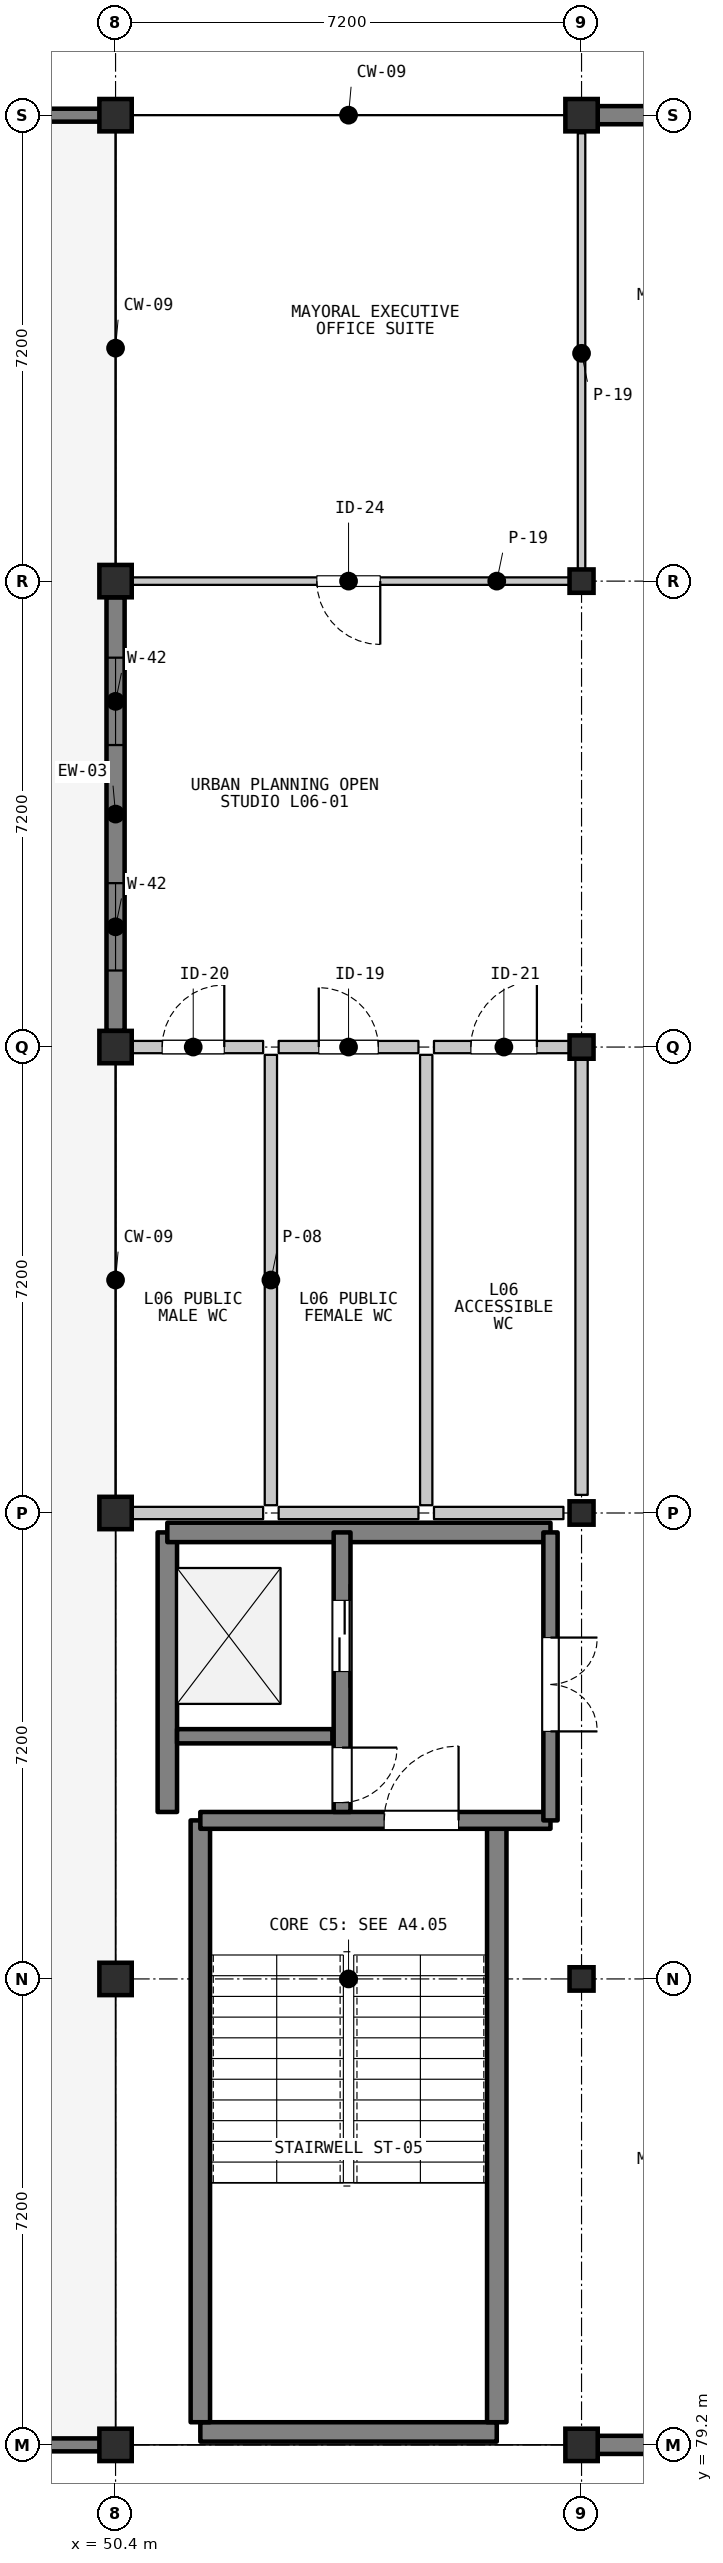
"""IFC4 building model, lengths in metres.
Left out: names, types, materials, properties, quantities, classifications, styles, units other than length and angle.
Written with IfcOpenShell. Run it as: python <this file> out.ifc"""

import sys

from ifc_helpers import new_model, si_unit, direction, frame, frame_2d, origin, origin_2d, place, context, subcontext, project, spatial, rectangle, i_section, extrude, element, fill, save


model = new_model("IFC4")
c1 = context("Model", 3, precision=1e-05, world=origin(), true_north=direction((0.0, 1.0)))
c2 = subcontext(c1, "Body", "Model", "MODEL_VIEW")
j1 = project(units=[si_unit("LENGTHUNIT", "METRE"), si_unit("PLANEANGLEUNIT", "RADIAN")], contexts=[c1])
p1 = place(None, origin())
s1 = spatial("IfcSite", under=j1, at=p1, CompositionType="ELEMENT")
p2 = place(p1, origin())
s2 = spatial("IfcBuilding", under=s1, at=p2, CompositionType="ELEMENT")
p3 = place(p2, frame((0.0, 0.0, 21.9)))
s3 = spatial("IfcBuildingStorey", under=s2, at=p3, CompositionType="ELEMENT", Elevation=21.9)
for number, where, z_axis, x_axis in (
    (1, (50.4, 79.2, 0.0), (0.0, 0.0, 1.0), (1.0, 0.0, 0.0)),
    (2, (50.4, 86.4, 0.0), (0.0, 0.0, 1.0), (1.0, 0.0, 0.0)),
    (3, (50.4, 93.6, 0.0), (0.0, 0.0, 1.0), (1.0, 0.0, 0.0)),
    (4, (50.4, 100.8, 0.0), (0.0, 0.0, 1.0), (1.0, 0.0, 0.0)),
    (5, (50.4, 108.0, 0.0), (0.0, 0.0, 1.0), (1.0, 0.0, 0.0)),
    (6, (50.4, 115.2, 0.0), (0.0, 0.0, 1.0), (1.0, 0.0, 0.0)),
    (7, (57.6, 79.2, 0.0), (0.0, 0.0, 1.0), (1.0, 0.0, 0.0)),
):
    element("IfcColumn", number, at=place(p3, frame(where, z_axis=z_axis, x_axis=x_axis)), inside=s3, PredefinedType="COLUMN", context=c2, shape_type="SweptSolid", body=[
        extrude(rectangle(XDim=0.5, YDim=0.5, at=origin_2d()), origin(), (0.0, 0.0, 1.0), 3.9),
    ])
for number, where, z_axis, x_axis in (
    (8, (57.6, 86.4, 0.0), (0.0, 0.0, 1.0), (1.0, 0.0, 0.0)),
    (9, (57.6, 93.6, 0.0), (0.0, 0.0, 1.0), (1.0, 0.0, 0.0)),
    (10, (57.6, 100.8, 0.0), (0.0, 0.0, 1.0), (1.0, 0.0, 0.0)),
    (11, (57.6, 108.0, 0.0), (0.0, 0.0, 1.0), (1.0, 0.0, 0.0)),
):
    element("IfcColumn", number, at=place(p3, frame(where, z_axis=z_axis, x_axis=x_axis)), inside=s3, PredefinedType="COLUMN", context=c2, shape_type="SweptSolid", body=[
        extrude(i_section(OverallWidth=0.371, OverallDepth=0.361, WebThickness=0.012, FlangeThickness=0.02, FilletRadius=0.015, at=origin_2d()), origin(), (0.0, 0.0, 1.0), 3.9),
    ])
p4 = place(p3, frame((57.6, 115.2, 0.0), z_axis=(0.0, 0.0, 1.0), x_axis=(1.0, 0.0, 0.0)))
e12 = element("IfcColumn", 12, at=p4, inside=s3, PredefinedType="COLUMN", context=c2, shape_type="SweptSolid", body=[
    extrude(rectangle(XDim=0.5, YDim=0.5, at=origin_2d()), origin(), (0.0, 0.0, 1.0), 3.9),
])
p5 = place(p3, frame((50.4, 101.05, 0.0), z_axis=(0.0, 0.0, 1.0), x_axis=(0.0, 1.0, 0.0)))
e13 = element("IfcWall", 13, at=p5, inside=s3, PredefinedType="SOLIDWALL", context=c2, shape_type="SweptSolid", body=[
    extrude(rectangle(XDim=6.7, YDim=0.28, at=frame_2d((3.35, 0.0))), origin(), (0.0, 0.0, 1.0), 3.172),
])
p6 = place(p5, frame((0.933, 0.0, 0.95)))
e14 = element("IfcOpeningElement", 14, at=p6, cuts=e13, PredefinedType="OPENING", context=c2, shape_type="SweptSolid", body=[
    extrude(rectangle(XDim=1.35, YDim=1.85, at=frame_2d((0.675, 0.925))), frame((0.0, 0.15, 0.0), z_axis=(0.0, -1.0, 0.0), x_axis=(1.0, 0.0, 0.0)), (0.0, 0.0, 1.0), 0.3),
])
p7 = place(p5, frame((4.417, 0.0, 0.95)))
e15 = element("IfcOpeningElement", 15, at=p7, cuts=e13, PredefinedType="OPENING", context=c2, shape_type="SweptSolid", body=[
    extrude(rectangle(XDim=1.35, YDim=1.85, at=frame_2d((0.675, 0.925))), frame((0.0, 0.15, 0.0), z_axis=(0.0, -1.0, 0.0), x_axis=(1.0, 0.0, 0.0)), (0.0, 0.0, 1.0), 0.3),
])
p8 = place(p3, frame((64.55, 79.2, 0.0), z_axis=(0.0, 0.0, 1.0), x_axis=(-1.0, 0.0, 0.0)))
e16 = element("IfcWall", 16, at=p8, inside=s3, PredefinedType="SOLIDWALL", context=c2, shape_type="SweptSolid", body=[
    extrude(rectangle(XDim=6.7, YDim=0.28, at=frame_2d((3.35, 0.0))), origin(), (0.0, 0.0, 1.0), 3.192),
])
p9 = place(p3, frame((57.85, 115.2, 0.0), z_axis=(0.0, 0.0, 1.0), x_axis=(1.0, 0.0, 0.0)))
e17 = element("IfcWall", 17, at=p9, inside=s3, PredefinedType="SOLIDWALL", context=c2, shape_type="SweptSolid", body=[
    extrude(rectangle(XDim=6.7, YDim=0.28, at=frame_2d((3.35, 0.0))), origin(), (0.0, 0.0, 1.0), 3.192),
])
p10 = place(p9, frame((0.883, 0.0, 0.95)))
e18 = element("IfcOpeningElement", 18, at=p10, cuts=e17, PredefinedType="OPENING", context=c2, shape_type="SweptSolid", body=[
    extrude(rectangle(XDim=1.45, YDim=1.85, at=frame_2d((0.725, 0.925))), frame((0.0, 0.15, 0.0), z_axis=(0.0, -1.0, 0.0), x_axis=(1.0, 0.0, 0.0)), (0.0, 0.0, 1.0), 0.3),
])
p11 = place(p9, frame((4.367, 0.0, 0.95)))
e19 = element("IfcOpeningElement", 19, at=p11, cuts=e17, PredefinedType="OPENING", context=c2, shape_type="SweptSolid", body=[
    extrude(rectangle(XDim=1.45, YDim=1.85, at=frame_2d((0.725, 0.925))), frame((0.0, 0.15, 0.0), z_axis=(0.0, -1.0, 0.0), x_axis=(1.0, 0.0, 0.0)), (0.0, 0.0, 1.0), 0.3),
])
for number, where, z_axis, x_axis in (
    (20, (43.35, 115.2, 0.0), (0.0, 0.0, 1.0), (1.0, 0.0, 0.0)),
    (21, (50.25, 79.2, 0.0), (0.0, 0.0, 1.0), (-1.0, 0.0, 0.0)),
):
    element("IfcWall", number, at=place(p3, frame(where, z_axis=z_axis, x_axis=x_axis)), inside=s3, PredefinedType="PARAPET", context=c2, shape_type="SweptSolid", body=[
        extrude(rectangle(XDim=6.9, YDim=0.2, at=frame_2d((3.45, 0.0))), origin(), (0.0, 0.0, 1.0), 0.85),
    ])
p12 = place(p3, frame((51.71, 79.4, 0.0), z_axis=(0.0, 0.0, 1.0), x_axis=(1.0, 0.0, 0.0)))
e22 = element("IfcWall", 22, at=p12, inside=s3, PredefinedType="SHEAR", context=c2, shape_type="SweptSolid", body=[
    extrude(rectangle(XDim=4.58, YDim=0.3, at=frame_2d((2.29, 0.0))), origin(), (0.0, 0.0, 1.0), 3.72),
])
for number, where, z_axis, x_axis in (
    (23, (51.71, 79.55, 0.0), (0.0, 0.0, 1.0), (0.0, 1.0, 0.0)),
    (24, (56.29, 79.55, 0.0), (0.0, 0.0, 1.0), (0.0, 1.0, 0.0)),
):
    element("IfcWall", number, at=place(p3, frame(where, z_axis=z_axis, x_axis=x_axis)), inside=s3, PredefinedType="SHEAR", context=c2, shape_type="SweptSolid", body=[
        extrude(rectangle(XDim=9.3, YDim=0.3, at=frame_2d((4.65, 0.0))), origin(), (0.0, 0.0, 1.0), 3.72),
    ])
p13 = place(p3, frame((51.71, 88.85, 0.0), z_axis=(0.0, 0.0, 1.0), x_axis=(1.0, 0.0, 0.0)))
e25 = element("IfcWall", 25, at=p13, inside=s3, PredefinedType="SHEAR", context=c2, shape_type="SweptSolid", body=[
    extrude(rectangle(XDim=5.41, YDim=0.26, at=frame_2d((2.705, 0.0))), origin(), (0.0, 0.0, 1.0), 3.72),
])
p14 = place(p13, frame((2.84, 0.0, 0.0)))
e26 = element("IfcOpeningElement", 26, at=p14, cuts=e25, PredefinedType="OPENING", context=c2, shape_type="SweptSolid", body=[
    extrude(rectangle(XDim=1.15, YDim=2.15, at=frame_2d((0.575, 1.075))), frame((0.0, 0.14, 0.0), z_axis=(0.0, -1.0, 0.0), x_axis=(1.0, 0.0, 0.0)), (0.0, 0.0, 1.0), 0.28),
])
p15 = place(p3, frame((51.2, 88.98, 0.0), z_axis=(0.0, 0.0, 1.0), x_axis=(0.0, 1.0, 0.0)))
e27 = element("IfcWall", 27, at=p15, inside=s3, PredefinedType="SHEAR", context=c2, shape_type="SweptSolid", body=[
    extrude(rectangle(XDim=4.32, YDim=0.3, at=frame_2d((2.16, 0.0))), origin(), (0.0, 0.0, 1.0), 3.72),
])
p16 = place(p3, frame((51.2, 93.3, 0.0), z_axis=(0.0, 0.0, 1.0), x_axis=(1.0, 0.0, 0.0)))
e28 = element("IfcWall", 28, at=p16, inside=s3, PredefinedType="SHEAR", context=c2, shape_type="SweptSolid", body=[
    extrude(rectangle(XDim=5.92, YDim=0.3, at=frame_2d((2.96, 0.0))), origin(), (0.0, 0.0, 1.0), 3.72),
])
p17 = place(p3, frame((51.35, 90.15, 0.0), z_axis=(0.0, 0.0, 1.0), x_axis=(1.0, 0.0, 0.0)))
e29 = element("IfcWall", 29, at=p17, inside=s3, PredefinedType="SHEAR", context=c2, shape_type="SweptSolid", body=[
    extrude(rectangle(XDim=2.4, YDim=0.22, at=frame_2d((1.2, 0.0))), origin(), (0.0, 0.0, 1.0), 3.72),
])
p18 = place(p3, frame((53.9, 93.3, 0.0), z_axis=(0.0, 0.0, 1.0), x_axis=(0.0, -1.0, 0.0)))
e30 = element("IfcWall", 30, at=p18, inside=s3, PredefinedType="SHEAR", context=c2, shape_type="SweptSolid", body=[
    extrude(rectangle(XDim=4.32, YDim=0.26, at=frame_2d((2.16, 0.0))), origin(), (0.0, 0.0, 1.0), 3.72),
])
p19 = place(p18, frame((1.05, 0.0, 0.0)))
e31 = element("IfcOpeningElement", 31, at=p19, cuts=e30, PredefinedType="OPENING", context=c2, shape_type="SweptSolid", body=[
    extrude(rectangle(XDim=1.1, YDim=2.15, at=frame_2d((0.55, 1.075))), frame((0.0, 0.14, 0.0), z_axis=(0.0, -1.0, 0.0), x_axis=(1.0, 0.0, 0.0)), (0.0, 0.0, 1.0), 0.28),
])
p20 = place(p18, frame((3.325, 0.0, 0.0)))
e32 = element("IfcOpeningElement", 32, at=p20, cuts=e30, PredefinedType="OPENING", context=c2, shape_type="SweptSolid", body=[
    extrude(rectangle(XDim=0.85, YDim=2.05, at=frame_2d((0.425, 1.025))), frame((0.0, 0.14, 0.0), z_axis=(0.0, -1.0, 0.0), x_axis=(1.0, 0.0, 0.0)), (0.0, 0.0, 1.0), 0.28),
])
p21 = place(p3, frame((57.12, 93.3, 0.0), z_axis=(0.0, 0.0, 1.0), x_axis=(0.0, -1.0, 0.0)))
e33 = element("IfcWall", 33, at=p21, inside=s3, PredefinedType="SHEAR", context=c2, shape_type="SweptSolid", body=[
    extrude(rectangle(XDim=4.45, YDim=0.22, at=frame_2d((2.225, 0.0))), origin(), (0.0, 0.0, 1.0), 3.72),
])
p22 = place(p21, frame((1.625, 0.0, 0.0)))
e34 = element("IfcOpeningElement", 34, at=p22, cuts=e33, PredefinedType="OPENING", context=c2, shape_type="SweptSolid", body=[
    extrude(rectangle(XDim=1.45, YDim=2.2, at=frame_2d((0.725, 1.1))), frame((0.0, 0.12, 0.0), z_axis=(0.0, -1.0, 0.0), x_axis=(1.0, 0.0, 0.0)), (0.0, 0.0, 1.0), 0.24),
])
p23 = place(p3, frame((50.52, 100.8, 0.0), z_axis=(0.0, 0.0, 1.0), x_axis=(1.0, 0.0, 0.0)))
e35 = element("IfcWall", 35, at=p23, inside=s3, PredefinedType="PARTITIONING", context=c2, shape_type="SweptSolid", body=[
    extrude(rectangle(XDim=2.16, YDim=0.19, at=frame_2d((1.08, 0.0))), origin(), (0.0, 0.0, 1.0), 3.088),
])
p24 = place(p23, frame((0.6, 0.0, 0.0)))
e36 = element("IfcOpeningElement", 36, at=p24, cuts=e35, PredefinedType="OPENING", context=c2, shape_type="SweptSolid", body=[
    extrude(rectangle(XDim=0.96, YDim=2.1, at=frame_2d((0.48, 1.05))), frame((0.0, 0.105, 0.0), z_axis=(0.0, -1.0, 0.0), x_axis=(1.0, 0.0, 0.0)), (0.0, 0.0, 1.0), 0.21),
])
p25 = place(p3, frame((52.68, 93.6, 0.0), z_axis=(0.0, 0.0, 1.0), x_axis=(-1.0, 0.0, 0.0)))
e37 = element("IfcWall", 37, at=p25, inside=s3, PredefinedType="PARTITIONING", context=c2, shape_type="SweptSolid", body=[
    extrude(rectangle(XDim=2.16, YDim=0.19, at=frame_2d((1.08, 0.0))), origin(), (0.0, 0.0, 1.0), 3.088),
])
p26 = place(p3, frame((52.8, 100.68, 0.0), z_axis=(0.0, 0.0, 1.0), x_axis=(0.0, -1.0, 0.0)))
e38 = element("IfcWall", 38, at=p26, inside=s3, PredefinedType="PARTITIONING", context=c2, shape_type="SweptSolid", body=[
    extrude(rectangle(XDim=6.96, YDim=0.19, at=frame_2d((3.48, 0.0))), origin(), (0.0, 0.0, 1.0), 3.088),
])
p27 = place(p3, frame((52.92, 100.8, 0.0), z_axis=(0.0, 0.0, 1.0), x_axis=(1.0, 0.0, 0.0)))
e39 = element("IfcWall", 39, at=p27, inside=s3, PredefinedType="PARTITIONING", context=c2, shape_type="SweptSolid", body=[
    extrude(rectangle(XDim=2.16, YDim=0.19, at=frame_2d((1.08, 0.0))), origin(), (0.0, 0.0, 1.0), 3.088),
])
p28 = place(p27, frame((0.62, 0.0, 0.0)))
e40 = element("IfcOpeningElement", 40, at=p28, cuts=e39, PredefinedType="OPENING", context=c2, shape_type="SweptSolid", body=[
    extrude(rectangle(XDim=0.92, YDim=2.1, at=frame_2d((0.46, 1.05))), frame((0.0, 0.105, 0.0), z_axis=(0.0, -1.0, 0.0), x_axis=(1.0, 0.0, 0.0)), (0.0, 0.0, 1.0), 0.21),
])
p29 = place(p3, frame((55.08, 93.6, 0.0), z_axis=(0.0, 0.0, 1.0), x_axis=(-1.0, 0.0, 0.0)))
e41 = element("IfcWall", 41, at=p29, inside=s3, PredefinedType="PARTITIONING", context=c2, shape_type="SweptSolid", body=[
    extrude(rectangle(XDim=2.16, YDim=0.19, at=frame_2d((1.08, 0.0))), origin(), (0.0, 0.0, 1.0), 3.088),
])
p30 = place(p3, frame((55.2, 100.68, 0.0), z_axis=(0.0, 0.0, 1.0), x_axis=(0.0, -1.0, 0.0)))
e42 = element("IfcWall", 42, at=p30, inside=s3, PredefinedType="PARTITIONING", context=c2, shape_type="SweptSolid", body=[
    extrude(rectangle(XDim=6.96, YDim=0.19, at=frame_2d((3.48, 0.0))), origin(), (0.0, 0.0, 1.0), 3.088),
])
p31 = place(p3, frame((55.32, 100.8, 0.0), z_axis=(0.0, 0.0, 1.0), x_axis=(1.0, 0.0, 0.0)))
e43 = element("IfcWall", 43, at=p31, inside=s3, PredefinedType="PARTITIONING", context=c2, shape_type="SweptSolid", body=[
    extrude(rectangle(XDim=2.16, YDim=0.19, at=frame_2d((1.08, 0.0))), origin(), (0.0, 0.0, 1.0), 3.088),
])
p32 = place(p31, frame((0.57, 0.0, 0.0)))
e44 = element("IfcOpeningElement", 44, at=p32, cuts=e43, PredefinedType="OPENING", context=c2, shape_type="SweptSolid", body=[
    extrude(rectangle(XDim=1.02, YDim=2.15, at=frame_2d((0.51, 1.075))), frame((0.0, 0.105, 0.0), z_axis=(0.0, -1.0, 0.0), x_axis=(1.0, 0.0, 0.0)), (0.0, 0.0, 1.0), 0.21),
])
p33 = place(p3, frame((57.32, 93.6, 0.0), z_axis=(0.0, 0.0, 1.0), x_axis=(-1.0, 0.0, 0.0)))
e45 = element("IfcWall", 45, at=p33, inside=s3, PredefinedType="PARTITIONING", context=c2, shape_type="SweptSolid", body=[
    extrude(rectangle(XDim=2.0, YDim=0.19, at=frame_2d((1.0, 0.0))), origin(), (0.0, 0.0, 1.0), 3.088),
])
p34 = place(p3, frame((57.6, 100.68, 0.0), z_axis=(0.0, 0.0, 1.0), x_axis=(0.0, -1.0, 0.0)))
e46 = element("IfcWall", 46, at=p34, inside=s3, PredefinedType="PARTITIONING", context=c2, shape_type="SweptSolid", body=[
    extrude(rectangle(XDim=6.8, YDim=0.19, at=frame_2d((3.4, 0.0))), origin(), (0.0, 0.0, 1.0), 3.088),
])
p35 = place(p3, frame((57.48, 108.0, 0.0), z_axis=(0.0, 0.0, 1.0), x_axis=(-1.0, 0.0, 0.0)))
e47 = element("IfcWall", 47, at=p35, inside=s3, PredefinedType="PARTITIONING", context=c2, shape_type="SweptSolid", body=[
    extrude(rectangle(XDim=6.96, YDim=0.116, at=frame_2d((3.48, 0.0))), origin(), (0.0, 0.0, 1.0), 3.088),
])
p36 = place(p35, frame((2.99, 0.0, 0.0)))
e48 = element("IfcOpeningElement", 48, at=p36, cuts=e47, PredefinedType="OPENING", context=c2, shape_type="SweptSolid", body=[
    extrude(rectangle(XDim=0.98, YDim=2.15, at=frame_2d((0.49, 1.075))), frame((0.0, 0.068, 0.0), z_axis=(0.0, -1.0, 0.0), x_axis=(1.0, 0.0, 0.0)), (0.0, 0.0, 1.0), 0.136),
])
p37 = place(p3, frame((57.6, 114.92, 0.0), z_axis=(0.0, 0.0, 1.0), x_axis=(0.0, -1.0, 0.0)))
e49 = element("IfcWall", 49, at=p37, inside=s3, PredefinedType="PARTITIONING", context=c2, shape_type="SweptSolid", body=[
    extrude(rectangle(XDim=6.8, YDim=0.116, at=frame_2d((3.4, 0.0))), origin(), (0.0, 0.0, 1.0), 3.088),
])
p38 = place(p6, origin())
e50 = element("IfcWindow", 50, at=p38, inside=s3, PartitioningType="SINGLE_PANEL", PredefinedType="WINDOW", context=c2, shape_type="SweptSolid", body=[
    extrude(rectangle(XDim=1.35, YDim=1.85, at=frame_2d((0.675, 0.925))), frame((0.0, 0.03, 0.0), z_axis=(0.0, -1.0, 0.0), x_axis=(1.0, 0.0, 0.0)), (0.0, 0.0, 1.0), 0.06),
])
fill(e14, e50)
p39 = place(p7, origin())
e51 = element("IfcWindow", 51, at=p39, inside=s3, PartitioningType="SINGLE_PANEL", PredefinedType="WINDOW", context=c2, shape_type="SweptSolid", body=[
    extrude(rectangle(XDim=1.35, YDim=1.85, at=frame_2d((0.675, 0.925))), frame((0.0, 0.03, 0.0), z_axis=(0.0, -1.0, 0.0), x_axis=(1.0, 0.0, 0.0)), (0.0, 0.0, 1.0), 0.06),
])
fill(e15, e51)
p40 = place(p14, origin())
e52 = element("IfcDoor", 52, at=p40, inside=s3, OperationType="SINGLE_SWING_RIGHT", PredefinedType="DOOR", context=c2, shape_type="SweptSolid", body=[
    extrude(rectangle(XDim=1.15, YDim=2.15, at=frame_2d((0.575, 1.075))), frame((0.0, 0.025, 0.0), z_axis=(0.0, -1.0, 0.0), x_axis=(1.0, 0.0, 0.0)), (0.0, 0.0, 1.0), 0.05),
])
fill(e26, e52)
p41 = place(p19, origin())
e53 = element("IfcDoor", 53, at=p41, inside=s3, OperationType="DOUBLE_DOOR_SLIDING", PredefinedType="DOOR", context=c2, shape_type="SweptSolid", body=[
    extrude(rectangle(XDim=1.1, YDim=2.15, at=frame_2d((0.55, 1.075))), frame((0.0, 0.025, 0.0), z_axis=(0.0, -1.0, 0.0), x_axis=(1.0, 0.0, 0.0)), (0.0, 0.0, 1.0), 0.05),
])
fill(e31, e53)
p42 = place(p20, origin())
e54 = element("IfcDoor", 54, at=p42, inside=s3, OperationType="SINGLE_SWING_LEFT", PredefinedType="DOOR", context=c2, shape_type="SweptSolid", body=[
    extrude(rectangle(XDim=0.85, YDim=2.05, at=frame_2d((0.425, 1.025))), frame((0.0, 0.025, 0.0), z_axis=(0.0, -1.0, 0.0), x_axis=(1.0, 0.0, 0.0)), (0.0, 0.0, 1.0), 0.05),
])
fill(e32, e54)
p43 = place(p22, origin())
e55 = element("IfcDoor", 55, at=p43, inside=s3, OperationType="DOUBLE_DOOR_SINGLE_SWING", PredefinedType="DOOR", context=c2, shape_type="SweptSolid", body=[
    extrude(rectangle(XDim=1.45, YDim=2.2, at=frame_2d((0.725, 1.1))), frame((0.0, 0.025, 0.0), z_axis=(0.0, -1.0, 0.0), x_axis=(1.0, 0.0, 0.0)), (0.0, 0.0, 1.0), 0.05),
])
fill(e34, e55)
p44 = place(p24, origin())
e56 = element("IfcDoor", 56, at=p44, inside=s3, OperationType="SINGLE_SWING_RIGHT", PredefinedType="DOOR", context=c2, shape_type="SweptSolid", body=[
    extrude(rectangle(XDim=0.96, YDim=2.1, at=frame_2d((0.48, 1.05))), frame((0.0, 0.025, 0.0), z_axis=(0.0, -1.0, 0.0), x_axis=(1.0, 0.0, 0.0)), (0.0, 0.0, 1.0), 0.05),
])
fill(e36, e56)
p45 = place(p28, origin())
e57 = element("IfcDoor", 57, at=p45, inside=s3, OperationType="SINGLE_SWING_LEFT", PredefinedType="DOOR", context=c2, shape_type="SweptSolid", body=[
    extrude(rectangle(XDim=0.92, YDim=2.1, at=frame_2d((0.46, 1.05))), frame((0.0, 0.025, 0.0), z_axis=(0.0, -1.0, 0.0), x_axis=(1.0, 0.0, 0.0)), (0.0, 0.0, 1.0), 0.05),
])
fill(e40, e57)
p46 = place(p32, origin())
e58 = element("IfcDoor", 58, at=p46, inside=s3, OperationType="SINGLE_SWING_RIGHT", PredefinedType="DOOR", context=c2, shape_type="SweptSolid", body=[
    extrude(rectangle(XDim=1.02, YDim=2.15, at=frame_2d((0.51, 1.075))), frame((0.0, 0.025, 0.0), z_axis=(0.0, -1.0, 0.0), x_axis=(1.0, 0.0, 0.0)), (0.0, 0.0, 1.0), 0.05),
])
fill(e44, e58)
p47 = place(p36, origin())
e59 = element("IfcDoor", 59, at=p47, inside=s3, OperationType="SINGLE_SWING_LEFT", PredefinedType="DOOR", context=c2, shape_type="SweptSolid", body=[
    extrude(rectangle(XDim=0.98, YDim=2.15, at=frame_2d((0.49, 1.075))), frame((0.0, 0.025, 0.0), z_axis=(0.0, -1.0, 0.0), x_axis=(1.0, 0.0, 0.0)), (0.0, 0.0, 1.0), 0.05),
])
fill(e48, e59)
save(model, sys.argv[1])
